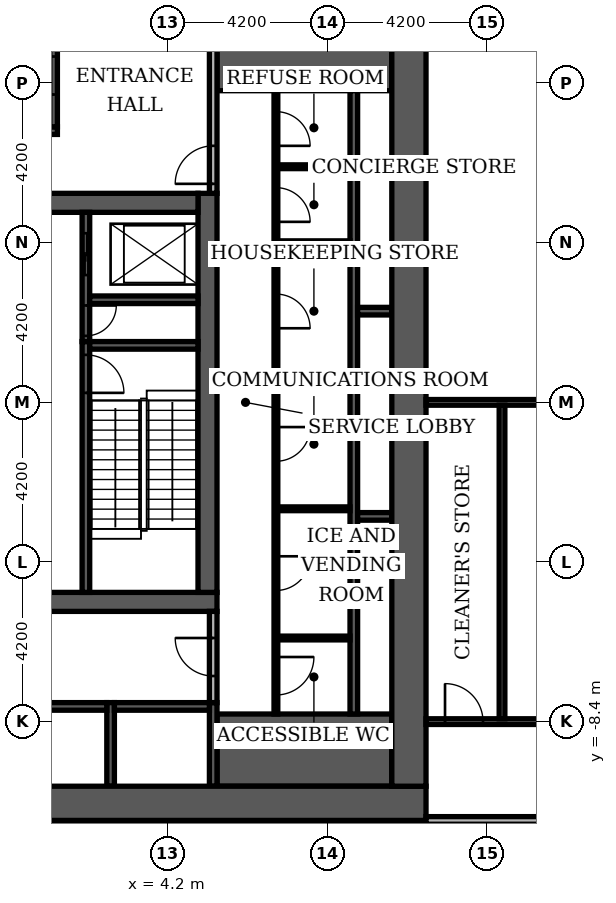
"""IFC4 building model, lengths in metres.
Left out: names, types, materials, properties, quantities, classifications, styles, units other than length and angle.
Written with IfcOpenShell. Run it as: python <this file> out.ifc"""

import sys

from ifc_helpers import new_model, si_unit, direction, frame, frame_2d, origin, place, context, subcontext, project, spatial, rectangle, extrude, element, fill, save


model = new_model("IFC4")
c1 = context("Model", 3, precision=1e-05, world=origin(), true_north=direction((0.0, 1.0)))
c2 = subcontext(c1, "Body", "Model", "MODEL_VIEW")
j1 = project(units=[si_unit("LENGTHUNIT", "METRE"), si_unit("PLANEANGLEUNIT", "RADIAN")], contexts=[c1])
p1 = place(None, origin())
s1 = spatial("IfcSite", under=j1, at=p1, CompositionType="ELEMENT")
p2 = place(p1, origin())
s2 = spatial("IfcBuilding", under=s1, at=p2, CompositionType="ELEMENT")
p3 = place(p2, frame((0.0, 0.0, 12.0)))
s3 = spatial("IfcBuildingStorey", under=s2, at=p3, CompositionType="ELEMENT", Elevation=12.0)
p4 = place(p3, frame((-5.5, -5.25, 0.0), z_axis=(0.0, 0.0, 1.0), x_axis=(1.0, 0.0, 0.0)))
e1 = element("IfcWall", 1, at=p4, inside=s3, PredefinedType="SHEAR", context=c2, shape_type="SweptSolid", body=[
    extrude(rectangle(XDim=11.0, YDim=0.5, at=frame_2d((5.5, 0.0))), origin(), (0.0, 0.0, 1.0), 4.38),
])
p5 = place(p4, frame((4.9, 0.0, 0.0)))
e2 = element("IfcOpeningElement", 2, at=p5, cuts=e1, PredefinedType="OPENING", context=c2, shape_type="SweptSolid", body=[
    extrude(rectangle(XDim=1.2, YDim=2.1, at=frame_2d((0.6, 1.05))), frame((0.0, 0.26, 0.0), z_axis=(0.0, -1.0, 0.0), x_axis=(1.0, 0.0, 0.0)), (0.0, 0.0, 1.0), 0.52),
])
p6 = place(p3, frame((5.25, -5.0, 0.0), z_axis=(0.0, 0.0, 1.0), x_axis=(0.0, 1.0, 0.0)))
e3 = element("IfcWall", 3, at=p6, inside=s3, PredefinedType="SHEAR", context=c2, shape_type="SweptSolid", body=[
    extrude(rectangle(XDim=10.5, YDim=0.5, at=frame_2d((5.25, 0.0))), origin(), (0.0, 0.0, 1.0), 4.38),
])
p7 = place(p3, frame((-5.0, 5.25, 0.0), z_axis=(0.0, 0.0, 1.0), x_axis=(1.0, 0.0, 0.0)))
e4 = element("IfcWall", 4, at=p7, inside=s3, PredefinedType="SHEAR", context=c2, shape_type="SweptSolid", body=[
    extrude(rectangle(XDim=10.0, YDim=0.5, at=frame_2d((5.0, 0.0))), origin(), (0.0, 0.0, 1.0), 4.38),
])
p8 = place(p7, frame((4.4, 0.0, 0.0)))
e5 = element("IfcOpeningElement", 5, at=p8, cuts=e4, PredefinedType="OPENING", context=c2, shape_type="SweptSolid", body=[
    extrude(rectangle(XDim=1.2, YDim=2.1, at=frame_2d((0.6, 1.05))), frame((0.0, 0.26, 0.0), z_axis=(0.0, -1.0, 0.0), x_axis=(1.0, 0.0, 0.0)), (0.0, 0.0, 1.0), 0.52),
])
for number, where, z_axis, x_axis in (
    (6, (5.5, -9.15, 0.0), (0.0, 0.0, 1.0), (1.0, 0.0, 0.0)),
    (7, (5.5, 9.15, 0.0), (0.0, 0.0, 1.0), (1.0, 0.0, 0.0)),
):
    element("IfcWall", number, at=place(p3, frame(where, z_axis=z_axis, x_axis=x_axis)), inside=s3, PredefinedType="SHEAR", context=c2, shape_type="SweptSolid", body=[
        extrude(rectangle(XDim=4.6, YDim=1.9, at=frame_2d((2.3, 0.0))), origin(), (0.0, 0.0, 1.0), 4.38),
    ])
p9 = place(p3, frame((2.05, -5.0, 0.0), z_axis=(0.0, 0.0, 1.0), x_axis=(0.0, 1.0, 0.0)))
e8 = element("IfcWall", 8, at=p9, inside=s3, PredefinedType="SHEAR", context=c2, shape_type="SweptSolid", body=[
    extrude(rectangle(XDim=6.6, YDim=0.2, at=frame_2d((3.3, 0.0))), origin(), (0.0, 0.0, 1.0), 4.38),
])
p10 = place(p9, frame((5.25, 0.0, 0.0)))
e9 = element("IfcOpeningElement", 9, at=p10, cuts=e8, PredefinedType="OPENING", context=c2, shape_type="SweptSolid", body=[
    extrude(rectangle(XDim=1.0, YDim=2.1, at=frame_2d((0.5, 1.05))), frame((0.0, 0.11, 0.0), z_axis=(0.0, -1.0, 0.0), x_axis=(1.0, 0.0, 0.0)), (0.0, 0.0, 1.0), 0.22),
])
p11 = place(p3, frame((2.15, 1.5, 0.0), z_axis=(0.0, 0.0, 1.0), x_axis=(1.0, 0.0, 0.0)))
e10 = element("IfcWall", 10, at=p11, inside=s3, PredefinedType="SHEAR", context=c2, shape_type="SweptSolid", body=[
    extrude(rectangle(XDim=2.85, YDim=0.2, at=frame_2d((1.425, 0.0))), origin(), (0.0, 0.0, 1.0), 4.38),
])
p12 = place(p3, frame((-5.5, 7.15, 0.0), z_axis=(0.0, 0.0, 1.0), x_axis=(1.0, 0.0, 0.0)))
e11 = element("IfcWall", 11, at=p12, inside=s3, PredefinedType="SHEAR", context=c2, shape_type="SweptSolid", body=[
    extrude(rectangle(XDim=6.8, YDim=0.2, at=frame_2d((3.4, 0.0))), origin(), (0.0, 0.0, 1.0), 4.38),
])
p13 = place(p3, frame((1.2, 7.25, 0.0), z_axis=(0.0, 0.0, 1.0), x_axis=(0.0, 1.0, 0.0)))
e12 = element("IfcWall", 12, at=p13, inside=s3, PredefinedType="SHEAR", context=c2, shape_type="SweptSolid", body=[
    extrude(rectangle(XDim=2.85, YDim=0.2, at=frame_2d((1.425, 0.0))), origin(), (0.0, 0.0, 1.0), 4.38),
])
p14 = place(p13, frame((0.85, 0.0, 0.0)))
e13 = element("IfcOpeningElement", 13, at=p14, cuts=e12, PredefinedType="OPENING", context=c2, shape_type="SweptSolid", body=[
    extrude(rectangle(XDim=1.0, YDim=2.1, at=frame_2d((0.5, 1.05))), frame((0.0, 0.11, 0.0), z_axis=(0.0, -1.0, 0.0), x_axis=(1.0, 0.0, 0.0)), (0.0, 0.0, 1.0), 0.22),
])
for number, where, z_axis, x_axis in (
    (14, (2.7, -10.1, 0.0), (0.0, 0.0, 1.0), (0.0, 1.0, 0.0)),
    (15, (5.4, -10.1, 0.0), (0.0, 0.0, 1.0), (0.0, 1.0, 0.0)),
):
    element("IfcWall", number, at=place(p3, frame(where, z_axis=z_axis, x_axis=x_axis)), inside=s3, PredefinedType="SHEAR", context=c2, shape_type="SweptSolid", body=[
        extrude(rectangle(XDim=2.2, YDim=0.2, at=frame_2d((1.1, 0.0))), origin(), (0.0, 0.0, 1.0), 4.38),
    ])
p15 = place(p3, frame((9.1, -8.2, 0.0), z_axis=(0.0, 0.0, 1.0), x_axis=(0.0, 1.0, 0.0)))
e16 = element("IfcWall", 16, at=p15, inside=s3, PredefinedType="SHEAR", context=c2, shape_type="SweptSolid", body=[
    extrude(rectangle(XDim=16.4, YDim=0.2, at=frame_2d((8.2, 0.0))), origin(), (0.0, 0.0, 1.0), 4.38),
])
for number, where, z_axis, x_axis in (
    (17, (0.1, -8.0, 0.0), (0.0, 0.0, 1.0), (1.0, 0.0, 0.0)),
    (18, (2.8, -8.0, 0.0), (0.0, 0.0, 1.0), (1.0, 0.0, 0.0)),
):
    element("IfcWall", number, at=place(p3, frame(where, z_axis=z_axis, x_axis=x_axis)), inside=s3, PredefinedType="SHEAR", context=c2, shape_type="SweptSolid", body=[
        extrude(rectangle(XDim=2.5, YDim=0.2, at=frame_2d((1.25, 0.0))), origin(), (0.0, 0.0, 1.0), 4.38),
    ])
p16 = place(p3, frame((9.2, -3.0, 0.0), z_axis=(0.0, 0.0, 1.0), x_axis=(1.0, 0.0, 0.0)))
e19 = element("IfcWall", 19, at=p16, inside=s3, PredefinedType="SHEAR", context=c2, shape_type="SweptSolid", body=[
    extrude(rectangle(XDim=0.9, YDim=0.2, at=frame_2d((0.45, 0.0))), origin(), (0.0, 0.0, 1.0), 4.38),
])
p17 = place(p3, frame((2.05, 1.6, 0.0), z_axis=(0.0, 0.0, 1.0), x_axis=(0.0, 1.0, 0.0)))
e20 = element("IfcWall", 20, at=p17, inside=s3, PredefinedType="SHEAR", context=c2, shape_type="SweptSolid", body=[
    extrude(rectangle(XDim=3.4, YDim=0.2, at=frame_2d((1.7, 0.0))), origin(), (0.0, 0.0, 1.0), 4.38),
])
p18 = place(p17, frame((1.75, 0.0, 0.0)))
e21 = element("IfcOpeningElement", 21, at=p18, cuts=e20, PredefinedType="OPENING", context=c2, shape_type="SweptSolid", body=[
    extrude(rectangle(XDim=1.1, YDim=2.1, at=frame_2d((0.55, 1.05))), frame((0.0, 0.11, 0.0), z_axis=(0.0, -1.0, 0.0), x_axis=(1.0, 0.0, 0.0)), (0.0, 0.0, 1.0), 0.22),
])
p19 = place(p17, frame((0.15, 0.0, 0.0)))
e22 = element("IfcOpeningElement", 22, at=p19, cuts=e20, PredefinedType="OPENING", context=c2, shape_type="SweptSolid", body=[
    extrude(rectangle(XDim=0.8, YDim=2.1, at=frame_2d((0.4, 1.05))), frame((0.0, 0.11, 0.0), z_axis=(0.0, -1.0, 0.0), x_axis=(1.0, 0.0, 0.0)), (0.0, 0.0, 1.0), 0.22),
])
p20 = place(p3, frame((9.2, 2.4, 0.0), z_axis=(0.0, 0.0, 1.0), x_axis=(1.0, 0.0, 0.0)))
e23 = element("IfcWall", 23, at=p20, inside=s3, PredefinedType="SHEAR", context=c2, shape_type="SweptSolid", body=[
    extrude(rectangle(XDim=0.9, YDim=0.2, at=frame_2d((0.45, 0.0))), origin(), (0.0, 0.0, 1.0), 4.38),
])
p21 = place(p3, frame((2.15, 2.7, 0.0), z_axis=(0.0, 0.0, 1.0), x_axis=(1.0, 0.0, 0.0)))
e24 = element("IfcWall", 24, at=p21, inside=s3, PredefinedType="SHEAR", context=c2, shape_type="SweptSolid", body=[
    extrude(rectangle(XDim=2.85, YDim=0.2, at=frame_2d((1.425, 0.0))), origin(), (0.0, 0.0, 1.0), 4.38),
])
p22 = place(p3, frame((-11.0, -10.55, 0.0), z_axis=(0.0, 0.0, 1.0), x_axis=(1.0, 0.0, 0.0)))
e25 = element("IfcWall", 25, at=p22, inside=s3, PredefinedType="SHEAR", context=c2, shape_type="SweptSolid", body=[
    extrude(rectangle(XDim=22.0, YDim=0.9, at=frame_2d((11.0, 0.0))), origin(), (0.0, 0.0, 1.0), 4.38),
])
p23 = place(p22, frame((7.4, 0.0, 0.0)))
e26 = element("IfcOpeningElement", 26, at=p23, cuts=e25, PredefinedType="OPENING", context=c2, shape_type="SweptSolid", body=[
    extrude(rectangle(XDim=1.8, YDim=2.2, at=frame_2d((0.9, 1.1))), frame((0.0, 0.46, 0.0), z_axis=(0.0, -1.0, 0.0), x_axis=(1.0, 0.0, 0.0)), (0.0, 0.0, 1.0), 0.92),
])
p24 = place(p3, frame((10.55, -10.1, 0.0), z_axis=(0.0, 0.0, 1.0), x_axis=(0.0, 1.0, 0.0)))
e27 = element("IfcWall", 27, at=p24, inside=s3, PredefinedType="SHEAR", context=c2, shape_type="SweptSolid", body=[
    extrude(rectangle(XDim=20.2, YDim=0.9, at=frame_2d((10.1, 0.0))), origin(), (0.0, 0.0, 1.0), 4.38),
])
p25 = place(p3, frame((7.05, -8.2, 0.0), z_axis=(0.0, 0.0, 1.0), x_axis=(0.0, 1.0, 0.0)))
e28 = element("IfcWall", 28, at=p25, inside=s3, PredefinedType="PARTITIONING", context=c2, shape_type="SweptSolid", body=[
    extrude(rectangle(XDim=16.4, YDim=0.1, at=frame_2d((8.2, 0.0))), origin(), (0.0, 0.0, 1.0), 4.38),
])
p26 = place(p25, frame((0.5, 0.0, 0.0)))
e29 = element("IfcOpeningElement", 29, at=p26, cuts=e28, PredefinedType="OPENING", context=c2, shape_type="SweptSolid", body=[
    extrude(rectangle(XDim=1.0, YDim=2.1, at=frame_2d((0.5, 1.05))), frame((0.0, 0.06, 0.0), z_axis=(0.0, -1.0, 0.0), x_axis=(1.0, 0.0, 0.0)), (0.0, 0.0, 1.0), 0.12),
])
p27 = place(p25, frame((3.25, 0.0, 0.0)))
e30 = element("IfcOpeningElement", 30, at=p27, cuts=e28, PredefinedType="OPENING", context=c2, shape_type="SweptSolid", body=[
    extrude(rectangle(XDim=0.9, YDim=2.1, at=frame_2d((0.45, 1.05))), frame((0.0, 0.06, 0.0), z_axis=(0.0, -1.0, 0.0), x_axis=(1.0, 0.0, 0.0)), (0.0, 0.0, 1.0), 0.12),
])
p28 = place(p25, frame((6.65, 0.0, 0.0)))
e31 = element("IfcOpeningElement", 31, at=p28, cuts=e28, PredefinedType="OPENING", context=c2, shape_type="SweptSolid", body=[
    extrude(rectangle(XDim=0.9, YDim=2.1, at=frame_2d((0.45, 1.05))), frame((0.0, 0.06, 0.0), z_axis=(0.0, -1.0, 0.0), x_axis=(1.0, 0.0, 0.0)), (0.0, 0.0, 1.0), 0.12),
])
p29 = place(p25, frame((10.15, 0.0, 0.0)))
e32 = element("IfcOpeningElement", 32, at=p29, cuts=e28, PredefinedType="OPENING", context=c2, shape_type="SweptSolid", body=[
    extrude(rectangle(XDim=0.9, YDim=2.1, at=frame_2d((0.45, 1.05))), frame((0.0, 0.06, 0.0), z_axis=(0.0, -1.0, 0.0), x_axis=(1.0, 0.0, 0.0)), (0.0, 0.0, 1.0), 0.12),
])
p30 = place(p25, frame((12.95, 0.0, 0.0)))
e33 = element("IfcOpeningElement", 33, at=p30, cuts=e28, PredefinedType="OPENING", context=c2, shape_type="SweptSolid", body=[
    extrude(rectangle(XDim=0.9, YDim=2.1, at=frame_2d((0.45, 1.05))), frame((0.0, 0.06, 0.0), z_axis=(0.0, -1.0, 0.0), x_axis=(1.0, 0.0, 0.0)), (0.0, 0.0, 1.0), 0.12),
])
p31 = place(p25, frame((14.95, 0.0, 0.0)))
e34 = element("IfcOpeningElement", 34, at=p31, cuts=e28, PredefinedType="OPENING", context=c2, shape_type="SweptSolid", body=[
    extrude(rectangle(XDim=0.9, YDim=2.1, at=frame_2d((0.45, 1.05))), frame((0.0, 0.06, 0.0), z_axis=(0.0, -1.0, 0.0), x_axis=(1.0, 0.0, 0.0)), (0.0, 0.0, 1.0), 0.12),
])
p32 = place(p3, frame((5.4, -7.9, 0.0), z_axis=(0.0, 0.0, 1.0), x_axis=(0.0, 1.0, 0.0)))
e35 = element("IfcWall", 35, at=p32, inside=s3, PredefinedType="PARTITIONING", context=c2, shape_type="SweptSolid", body=[
    extrude(rectangle(XDim=2.4, YDim=0.2, at=frame_2d((1.2, 0.0))), origin(), (0.0, 0.0, 1.0), 4.38),
])
p33 = place(p32, frame((0.7, 0.0, 0.0)))
e36 = element("IfcOpeningElement", 36, at=p33, cuts=e35, PredefinedType="OPENING", context=c2, shape_type="SweptSolid", body=[
    extrude(rectangle(XDim=1.0, YDim=2.1, at=frame_2d((0.5, 1.05))), frame((0.0, 0.11, 0.0), z_axis=(0.0, -1.0, 0.0), x_axis=(1.0, 0.0, 0.0)), (0.0, 0.0, 1.0), 0.22),
])
for number, where, z_axis, x_axis in (
    (37, (7.1, -6.2, 0.0), (0.0, 0.0, 1.0), (1.0, 0.0, 0.0)),
    (38, (7.1, -2.8, 0.0), (0.0, 0.0, 1.0), (1.0, 0.0, 0.0)),
    (39, (7.1, 0.6, 0.0), (0.0, 0.0, 1.0), (1.0, 0.0, 0.0)),
    (40, (7.1, 4.2, 0.0), (0.0, 0.0, 1.0), (1.0, 0.0, 0.0)),
):
    element("IfcWall", number, at=place(p3, frame(where, z_axis=z_axis, x_axis=x_axis)), inside=s3, PredefinedType="PARTITIONING", context=c2, shape_type="SweptSolid", body=[
        extrude(rectangle(XDim=1.9, YDim=0.1, at=frame_2d((0.95, 0.0))), origin(), (0.0, 0.0, 1.0), 4.38),
    ])
p34 = place(p3, frame((5.4, 5.5, 0.0), z_axis=(0.0, 0.0, 1.0), x_axis=(0.0, 1.0, 0.0)))
e41 = element("IfcWall", 41, at=p34, inside=s3, PredefinedType="PARTITIONING", context=c2, shape_type="SweptSolid", body=[
    extrude(rectangle(XDim=4.6, YDim=0.2, at=frame_2d((2.3, 0.0))), origin(), (0.0, 0.0, 1.0), 4.38),
])
p35 = place(p34, frame((0.25, 0.0, 0.0)))
e42 = element("IfcOpeningElement", 42, at=p35, cuts=e41, PredefinedType="OPENING", context=c2, shape_type="SweptSolid", body=[
    extrude(rectangle(XDim=1.0, YDim=2.1, at=frame_2d((0.5, 1.05))), frame((0.0, 0.11, 0.0), z_axis=(0.0, -1.0, 0.0), x_axis=(1.0, 0.0, 0.0)), (0.0, 0.0, 1.0), 0.22),
])
p36 = place(p3, frame((7.1, 6.2, 0.0), z_axis=(0.0, 0.0, 1.0), x_axis=(1.0, 0.0, 0.0)))
e43 = element("IfcWall", 43, at=p36, inside=s3, PredefinedType="PARTITIONING", context=c2, shape_type="SweptSolid", body=[
    extrude(rectangle(XDim=1.9, YDim=0.1, at=frame_2d((0.95, 0.0))), origin(), (0.0, 0.0, 1.0), 4.38),
])
p37 = place(p3, frame((11.0, -11.0, 0.0), z_axis=(0.0, 0.0, 1.0), x_axis=(1.0, 0.0, 0.0)))
e44 = element("IfcWall", 44, at=p37, inside=s3, PredefinedType="PARTITIONING", context=c2, shape_type="SweptSolid", body=[
    extrude(rectangle(XDim=14.1, YDim=0.2, at=frame_2d((7.05, 0.0))), origin(), (0.0, 0.0, 1.0), 4.38),
])
p38 = place(p37, frame((6.5, 0.0, 0.0)))
e45 = element("IfcOpeningElement", 45, at=p38, cuts=e44, PredefinedType="OPENING", context=c2, shape_type="SweptSolid", body=[
    extrude(rectangle(XDim=1.2, YDim=2.2, at=frame_2d((0.6, 1.1))), frame((0.0, 0.11, 0.0), z_axis=(0.0, -1.0, 0.0), x_axis=(1.0, 0.0, 0.0)), (0.0, 0.0, 1.0), 0.22),
])
p39 = place(p3, frame((11.0, -8.4, 0.0), z_axis=(0.0, 0.0, 1.0), x_axis=(1.0, 0.0, 0.0)))
e46 = element("IfcWall", 46, at=p39, inside=s3, PredefinedType="PARTITIONING", context=c2, shape_type="SweptSolid", body=[
    extrude(rectangle(XDim=13.6, YDim=0.15, at=frame_2d((6.8, 0.0))), origin(), (0.0, 0.0, 1.0), 4.38),
])
p40 = place(p39, frame((0.5, 0.0, 0.0)))
e47 = element("IfcOpeningElement", 47, at=p40, cuts=e46, PredefinedType="OPENING", context=c2, shape_type="SweptSolid", body=[
    extrude(rectangle(XDim=1.0, YDim=2.1, at=frame_2d((0.5, 1.05))), frame((0.0, 0.085, 0.0), z_axis=(0.0, -1.0, 0.0), x_axis=(1.0, 0.0, 0.0)), (0.0, 0.0, 1.0), 0.17),
])
p41 = place(p39, frame((3.7, 0.0, 0.0)))
e48 = element("IfcOpeningElement", 48, at=p41, cuts=e46, PredefinedType="OPENING", context=c2, shape_type="SweptSolid", body=[
    extrude(rectangle(XDim=1.0, YDim=2.1, at=frame_2d((0.5, 1.05))), frame((0.0, 0.085, 0.0), z_axis=(0.0, -1.0, 0.0), x_axis=(1.0, 0.0, 0.0)), (0.0, 0.0, 1.0), 0.17),
])
p42 = place(p39, frame((8.1, 0.0, 0.0)))
e49 = element("IfcOpeningElement", 49, at=p42, cuts=e46, PredefinedType="OPENING", context=c2, shape_type="SweptSolid", body=[
    extrude(rectangle(XDim=1.0, YDim=2.1, at=frame_2d((0.5, 1.05))), frame((0.0, 0.085, 0.0), z_axis=(0.0, -1.0, 0.0), x_axis=(1.0, 0.0, 0.0)), (0.0, 0.0, 1.0), 0.17),
])
p43 = place(p39, frame((11.3, 0.0, 0.0)))
e50 = element("IfcOpeningElement", 50, at=p43, cuts=e46, PredefinedType="OPENING", context=c2, shape_type="SweptSolid", body=[
    extrude(rectangle(XDim=1.0, YDim=2.1, at=frame_2d((0.5, 1.05))), frame((0.0, 0.085, 0.0), z_axis=(0.0, -1.0, 0.0), x_axis=(1.0, 0.0, 0.0)), (0.0, 0.0, 1.0), 0.17),
])
p44 = place(p3, frame((11.0, 0.0, 0.0), z_axis=(0.0, 0.0, 1.0), x_axis=(1.0, 0.0, 0.0)))
e51 = element("IfcWall", 51, at=p44, inside=s3, PredefinedType="PARTITIONING", context=c2, shape_type="SweptSolid", body=[
    extrude(rectangle(XDim=13.6, YDim=0.15, at=frame_2d((6.8, 0.0))), origin(), (0.0, 0.0, 1.0), 4.38),
])
p45 = place(p3, frame((13.0, -8.325, 0.0), z_axis=(0.0, 0.0, 1.0), x_axis=(0.0, 1.0, 0.0)))
e52 = element("IfcWall", 52, at=p45, inside=s3, PredefinedType="PARTITIONING", context=c2, shape_type="SweptSolid", body=[
    extrude(rectangle(XDim=8.25, YDim=0.15, at=frame_2d((4.125, 0.0))), origin(), (0.0, 0.0, 1.0), 4.38),
])
p46 = place(p18, origin())
e53 = element("IfcDoor", 53, at=p46, inside=s3, OperationType="SLIDING_TO_LEFT", PredefinedType="DOOR", context=c2, shape_type="SweptSolid", body=[
    extrude(rectangle(XDim=1.1, YDim=2.1, at=frame_2d((0.55, 1.05))), frame((0.0, 0.025, 0.0), z_axis=(0.0, -1.0, 0.0), x_axis=(1.0, 0.0, 0.0)), (0.0, 0.0, 1.0), 0.05),
])
fill(e21, e53)
p47 = place(p10, frame((1.0, 0.0, 0.0), z_axis=(0.0, 0.0, 1.0), x_axis=(-1.0, 0.0, 0.0)))
e54 = element("IfcDoor", 54, at=p47, inside=s3, OperationType="SINGLE_SWING_LEFT", PredefinedType="DOOR", context=c2, shape_type="SweptSolid", body=[
    extrude(rectangle(XDim=1.0, YDim=2.1, at=frame_2d((0.5, 1.05))), frame((0.0, 0.025, 0.0), z_axis=(0.0, -1.0, 0.0), x_axis=(1.0, 0.0, 0.0)), (0.0, 0.0, 1.0), 0.05),
])
fill(e9, e54)
p48 = place(p19, frame((0.8, 0.0, 0.0), z_axis=(0.0, 0.0, 1.0), x_axis=(-1.0, 0.0, 0.0)))
e55 = element("IfcDoor", 55, at=p48, inside=s3, OperationType="SINGLE_SWING_RIGHT", PredefinedType="DOOR", context=c2, shape_type="SweptSolid", body=[
    extrude(rectangle(XDim=0.8, YDim=2.1, at=frame_2d((0.4, 1.05))), frame((0.0, 0.025, 0.0), z_axis=(0.0, -1.0, 0.0), x_axis=(1.0, 0.0, 0.0)), (0.0, 0.0, 1.0), 0.05),
])
fill(e22, e55)
p49 = place(p14, origin())
e56 = element("IfcDoor", 56, at=p49, inside=s3, OperationType="SINGLE_SWING_LEFT", PredefinedType="DOOR", context=c2, shape_type="SweptSolid", body=[
    extrude(rectangle(XDim=1.0, YDim=2.1, at=frame_2d((0.5, 1.05))), frame((0.0, 0.025, 0.0), z_axis=(0.0, -1.0, 0.0), x_axis=(1.0, 0.0, 0.0)), (0.0, 0.0, 1.0), 0.05),
])
fill(e13, e56)
p50 = place(p35, origin())
e57 = element("IfcDoor", 57, at=p50, inside=s3, OperationType="SINGLE_SWING_LEFT", PredefinedType="DOOR", context=c2, shape_type="SweptSolid", body=[
    extrude(rectangle(XDim=1.0, YDim=2.1, at=frame_2d((0.5, 1.05))), frame((0.0, 0.025, 0.0), z_axis=(0.0, -1.0, 0.0), x_axis=(1.0, 0.0, 0.0)), (0.0, 0.0, 1.0), 0.05),
])
fill(e42, e57)
p51 = place(p33, origin())
e58 = element("IfcDoor", 58, at=p51, inside=s3, OperationType="SINGLE_SWING_RIGHT", PredefinedType="DOOR", context=c2, shape_type="SweptSolid", body=[
    extrude(rectangle(XDim=1.0, YDim=2.1, at=frame_2d((0.5, 1.05))), frame((0.0, 0.025, 0.0), z_axis=(0.0, -1.0, 0.0), x_axis=(1.0, 0.0, 0.0)), (0.0, 0.0, 1.0), 0.05),
])
fill(e36, e58)
p52 = place(p26, frame((1.0, 0.0, 0.0), z_axis=(0.0, 0.0, 1.0), x_axis=(-1.0, 0.0, 0.0)))
e59 = element("IfcDoor", 59, at=p52, inside=s3, OperationType="SINGLE_SWING_RIGHT", PredefinedType="DOOR", context=c2, shape_type="SweptSolid", body=[
    extrude(rectangle(XDim=1.0, YDim=2.1, at=frame_2d((0.5, 1.05))), frame((0.0, 0.025, 0.0), z_axis=(0.0, -1.0, 0.0), x_axis=(1.0, 0.0, 0.0)), (0.0, 0.0, 1.0), 0.05),
])
fill(e29, e59)
p53 = place(p27, frame((0.9, 0.0, 0.0), z_axis=(0.0, 0.0, 1.0), x_axis=(-1.0, 0.0, 0.0)))
e60 = element("IfcDoor", 60, at=p53, inside=s3, OperationType="SINGLE_SWING_RIGHT", PredefinedType="DOOR", context=c2, shape_type="SweptSolid", body=[
    extrude(rectangle(XDim=0.9, YDim=2.1, at=frame_2d((0.45, 1.05))), frame((0.0, 0.025, 0.0), z_axis=(0.0, -1.0, 0.0), x_axis=(1.0, 0.0, 0.0)), (0.0, 0.0, 1.0), 0.05),
])
fill(e30, e60)
p54 = place(p28, frame((0.9, 0.0, 0.0), z_axis=(0.0, 0.0, 1.0), x_axis=(-1.0, 0.0, 0.0)))
e61 = element("IfcDoor", 61, at=p54, inside=s3, OperationType="SINGLE_SWING_RIGHT", PredefinedType="DOOR", context=c2, shape_type="SweptSolid", body=[
    extrude(rectangle(XDim=0.9, YDim=2.1, at=frame_2d((0.45, 1.05))), frame((0.0, 0.025, 0.0), z_axis=(0.0, -1.0, 0.0), x_axis=(1.0, 0.0, 0.0)), (0.0, 0.0, 1.0), 0.05),
])
fill(e31, e61)
p55 = place(p29, frame((0.9, 0.0, 0.0), z_axis=(0.0, 0.0, 1.0), x_axis=(-1.0, 0.0, 0.0)))
e62 = element("IfcDoor", 62, at=p55, inside=s3, OperationType="SINGLE_SWING_LEFT", PredefinedType="DOOR", context=c2, shape_type="SweptSolid", body=[
    extrude(rectangle(XDim=0.9, YDim=2.1, at=frame_2d((0.45, 1.05))), frame((0.0, 0.025, 0.0), z_axis=(0.0, -1.0, 0.0), x_axis=(1.0, 0.0, 0.0)), (0.0, 0.0, 1.0), 0.05),
])
fill(e32, e62)
p56 = place(p30, frame((0.9, 0.0, 0.0), z_axis=(0.0, 0.0, 1.0), x_axis=(-1.0, 0.0, 0.0)))
e63 = element("IfcDoor", 63, at=p56, inside=s3, OperationType="SINGLE_SWING_LEFT", PredefinedType="DOOR", context=c2, shape_type="SweptSolid", body=[
    extrude(rectangle(XDim=0.9, YDim=2.1, at=frame_2d((0.45, 1.05))), frame((0.0, 0.025, 0.0), z_axis=(0.0, -1.0, 0.0), x_axis=(1.0, 0.0, 0.0)), (0.0, 0.0, 1.0), 0.05),
])
fill(e33, e63)
p57 = place(p31, frame((0.9, 0.0, 0.0), z_axis=(0.0, 0.0, 1.0), x_axis=(-1.0, 0.0, 0.0)))
e64 = element("IfcDoor", 64, at=p57, inside=s3, OperationType="SINGLE_SWING_LEFT", PredefinedType="DOOR", context=c2, shape_type="SweptSolid", body=[
    extrude(rectangle(XDim=0.9, YDim=2.1, at=frame_2d((0.45, 1.05))), frame((0.0, 0.025, 0.0), z_axis=(0.0, -1.0, 0.0), x_axis=(1.0, 0.0, 0.0)), (0.0, 0.0, 1.0), 0.05),
])
fill(e34, e64)
p58 = place(p40, origin())
e65 = element("IfcDoor", 65, at=p58, inside=s3, OperationType="SINGLE_SWING_LEFT", PredefinedType="DOOR", context=c2, shape_type="SweptSolid", body=[
    extrude(rectangle(XDim=1.0, YDim=2.1, at=frame_2d((0.5, 1.05))), frame((0.0, 0.025, 0.0), z_axis=(0.0, -1.0, 0.0), x_axis=(1.0, 0.0, 0.0)), (0.0, 0.0, 1.0), 0.05),
])
fill(e47, e65)
save(model, sys.argv[1])
